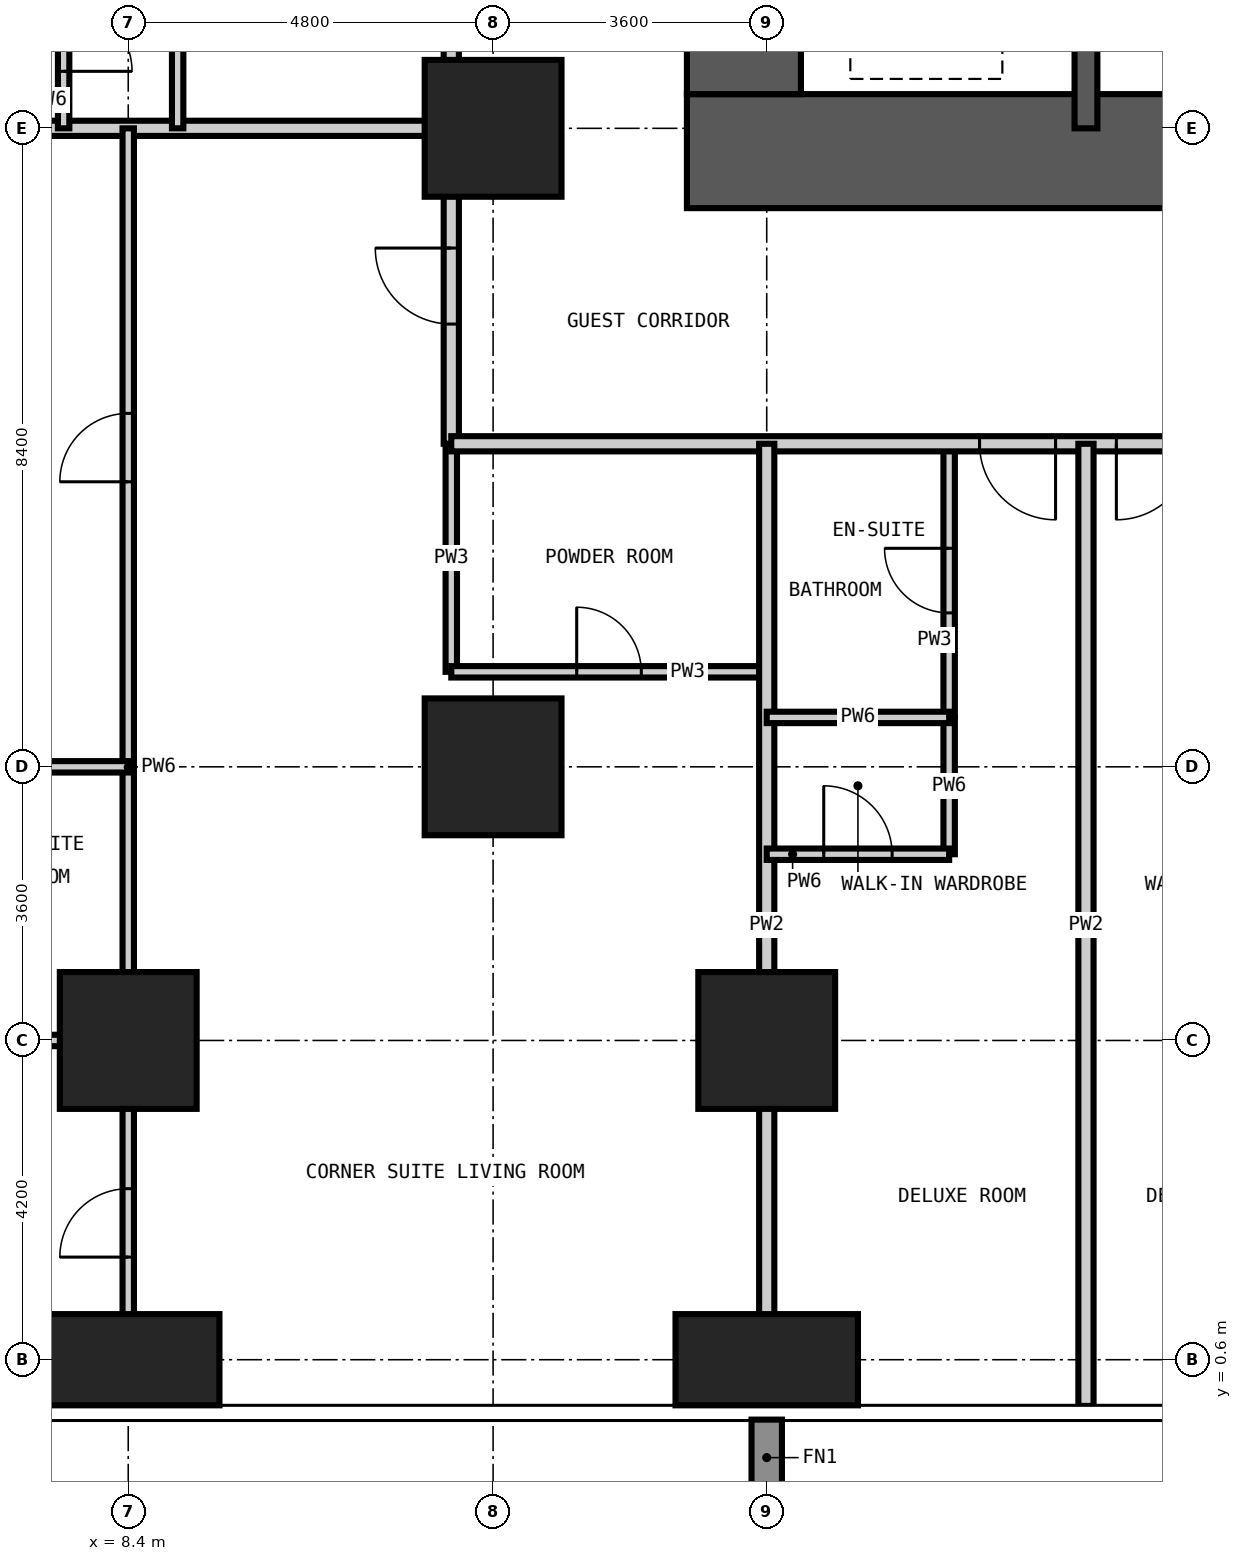
"""IFC4 building model, lengths in metres.
Left out: names, types, materials, properties, quantities, classifications, styles, units other than length and angle.
Written with IfcOpenShell. Run it as: python <this file> out.ifc"""

import sys

from ifc_helpers import new_model, si_unit, direction, frame, frame_2d, origin, origin_2d, place, context, subcontext, project, spatial, rectangle, extrude, element, fill, save


model = new_model("IFC4")
c1 = context("Model", 3, precision=1e-05, world=origin(), true_north=direction((0.0, 1.0)))
c2 = subcontext(c1, "Body", "Model", "MODEL_VIEW")
j1 = project(units=[si_unit("LENGTHUNIT", "METRE"), si_unit("PLANEANGLEUNIT", "RADIAN")], contexts=[c1])
p1 = place(None, origin())
s1 = spatial("IfcSite", under=j1, at=p1, CompositionType="ELEMENT")
p2 = place(p1, origin())
s2 = spatial("IfcBuilding", under=s1, at=p2, CompositionType="ELEMENT")
p3 = place(p2, frame((0.0, 0.0, 70.2)))
s3 = spatial("IfcBuildingStorey", under=s2, at=p3, CompositionType="ELEMENT", Elevation=70.2)
p4 = place(p3, frame((8.4, 0.6, -0.35), z_axis=(0.0, 0.0, 1.0), x_axis=(1.0, 0.0, 0.0)))
e1 = element("IfcColumn", 1, at=p4, inside=s3, PredefinedType="COLUMN", context=c2, shape_type="SweptSolid", body=[
    extrude(rectangle(XDim=2.4, YDim=1.2, at=origin_2d()), origin(), (0.0, 0.0, 1.0), 3.6),
])
for number, where, z_axis, x_axis in (
    (2, (8.4, 4.8, -0.35), (0.0, 0.0, 1.0), (1.0, 0.0, 0.0)),
    (3, (13.2, 8.4, -0.35), (0.0, 0.0, 1.0), (1.0, 0.0, 0.0)),
    (4, (13.2, 16.8, -0.35), (0.0, 0.0, 1.0), (1.0, 0.0, 0.0)),
):
    element("IfcColumn", number, at=place(p3, frame(where, z_axis=z_axis, x_axis=x_axis)), inside=s3, PredefinedType="COLUMN", context=c2, shape_type="SweptSolid", body=[
        extrude(rectangle(XDim=1.8, YDim=1.8, at=origin_2d()), origin(), (0.0, 0.0, 1.0), 3.6),
    ])
p5 = place(p3, frame((16.8, 0.6, -0.35), z_axis=(0.0, 0.0, 1.0), x_axis=(1.0, 0.0, 0.0)))
e5 = element("IfcColumn", 5, at=p5, inside=s3, PredefinedType="COLUMN", context=c2, shape_type="SweptSolid", body=[
    extrude(rectangle(XDim=2.4, YDim=1.2, at=origin_2d()), origin(), (0.0, 0.0, 1.0), 3.6),
])
p6 = place(p3, frame((16.8, 4.8, -0.35), z_axis=(0.0, 0.0, 1.0), x_axis=(1.0, 0.0, 0.0)))
e6 = element("IfcColumn", 6, at=p6, inside=s3, PredefinedType="COLUMN", context=c2, shape_type="SweptSolid", body=[
    extrude(rectangle(XDim=1.8, YDim=1.8, at=origin_2d()), origin(), (0.0, 0.0, 1.0), 3.6),
])
p7 = place(p3, frame((15.75, 16.5, -0.35), z_axis=(0.0, 0.0, 1.0), x_axis=(1.0, 0.0, 0.0)))
e7 = element("IfcWall", 7, at=p7, inside=s3, PredefinedType="SHEAR", context=c2, shape_type="SweptSolid", body=[
    extrude(rectangle(XDim=27.3, YDim=1.5, at=frame_2d((13.65, 0.0))), origin(), (0.0, 0.0, 1.0), 3.6),
])
p8 = place(p7, frame((13.15, 0.0, 0.35)))
e8 = element("IfcOpeningElement", 8, at=p8, cuts=e7, PredefinedType="OPENING", context=c2, shape_type="SweptSolid", body=[
    extrude(rectangle(XDim=1.0, YDim=2.1, at=frame_2d((0.5, 1.05))), frame((0.0, 0.76, 0.0), z_axis=(0.0, -1.0, 0.0), x_axis=(1.0, 0.0, 0.0)), (0.0, 0.0, 1.0), 1.52),
])
p9 = place(p7, frame((19.45, 0.0, 0.35)))
e9 = element("IfcOpeningElement", 9, at=p9, cuts=e7, PredefinedType="OPENING", context=c2, shape_type="SweptSolid", body=[
    extrude(rectangle(XDim=1.0, YDim=2.1, at=frame_2d((0.5, 1.05))), frame((0.0, 0.76, 0.0), z_axis=(0.0, -1.0, 0.0), x_axis=(1.0, 0.0, 0.0)), (0.0, 0.0, 1.0), 1.52),
])
p10 = place(p3, frame((16.5, 41.55, -0.35), z_axis=(0.0, 0.0, 1.0), x_axis=(0.0, -1.0, 0.0)))
e10 = element("IfcWall", 10, at=p10, inside=s3, PredefinedType="SHEAR", context=c2, shape_type="SweptSolid", body=[
    extrude(rectangle(XDim=24.3, YDim=1.5, at=frame_2d((12.15, 0.0))), origin(), (0.0, 0.0, 1.0), 3.6),
])
p11 = place(p10, frame((11.25, 0.0, 0.35)))
e11 = element("IfcOpeningElement", 11, at=p11, cuts=e10, PredefinedType="OPENING", context=c2, shape_type="SweptSolid", body=[
    extrude(rectangle(XDim=1.8, YDim=2.2, at=frame_2d((0.9, 1.1))), frame((0.0, 0.76, 0.0), z_axis=(0.0, -1.0, 0.0), x_axis=(1.0, 0.0, 0.0)), (0.0, 0.0, 1.0), 1.52),
])
p12 = place(p10, frame((20.05, 0.0, 0.35)))
e12 = element("IfcOpeningElement", 12, at=p12, cuts=e10, PredefinedType="OPENING", context=c2, shape_type="SweptSolid", body=[
    extrude(rectangle(XDim=1.0, YDim=2.1, at=frame_2d((0.5, 1.05))), frame((0.0, 0.76, 0.0), z_axis=(0.0, -1.0, 0.0), x_axis=(1.0, 0.0, 0.0)), (0.0, 0.0, 1.0), 1.52),
])
p13 = place(p10, frame((5.35, 0.0, 0.35)))
e13 = element("IfcOpeningElement", 13, at=p13, cuts=e10, PredefinedType="OPENING", context=c2, shape_type="SweptSolid", body=[
    extrude(rectangle(XDim=1.0, YDim=2.1, at=frame_2d((0.5, 1.05))), frame((0.0, 0.76, 0.0), z_axis=(0.0, -1.0, 0.0), x_axis=(1.0, 0.0, 0.0)), (0.0, 0.0, 1.0), 1.52),
])
p14 = place(p3, frame((21.0, 16.8, -0.35), z_axis=(0.0, 0.0, 1.0), x_axis=(0.0, 1.0, 0.0)))
e14 = element("IfcWall", 14, at=p14, inside=s3, PredefinedType="SHEAR", context=c2, shape_type="SweptSolid", body=[
    extrude(rectangle(XDim=2.8, YDim=0.3, at=frame_2d((1.4, 0.0))), origin(), (0.0, 0.0, 1.0), 3.6),
])
p15 = place(p3, frame((12.65, 9.65, 0.0), z_axis=(0.0, 0.0, 1.0), x_axis=(0.0, 1.0, 0.0)))
e15 = element("IfcWall", 15, at=p15, inside=s3, PredefinedType="PARTITIONING", context=c2, shape_type="SweptSolid", body=[
    extrude(rectangle(XDim=3.0, YDim=0.15, at=frame_2d((1.5, 0.0))), origin(), (0.0, 0.0, 1.0), 3.25),
])
p16 = place(p3, frame((19.2, 9.05, 0.0), z_axis=(0.0, 0.0, 1.0), x_axis=(0.0, 1.0, 0.0)))
e16 = element("IfcWall", 16, at=p16, inside=s3, PredefinedType="PARTITIONING", context=c2, shape_type="SweptSolid", body=[
    extrude(rectangle(XDim=3.6, YDim=0.15, at=frame_2d((1.8, 0.0))), origin(), (0.0, 0.0, 1.0), 3.25),
])
p17 = place(p16, frame((1.375, 0.0, 0.0)))
e17 = element("IfcOpeningElement", 17, at=p17, cuts=e16, PredefinedType="OPENING", context=c2, shape_type="SweptSolid", body=[
    extrude(rectangle(XDim=0.85, YDim=2.1, at=frame_2d((0.425, 1.05))), frame((0.0, 0.085, 0.0), z_axis=(0.0, -1.0, 0.0), x_axis=(1.0, 0.0, 0.0)), (0.0, 0.0, 1.0), 0.17),
])
p18 = place(p3, frame((5.4, 4.8, 0.0), z_axis=(0.0, 0.0, 1.0), x_axis=(1.0, 0.0, 0.0)))
e18 = element("IfcWall", 18, at=p18, inside=s3, PredefinedType="PARTITIONING", context=c2, shape_type="SweptSolid", body=[
    extrude(rectangle(XDim=3.0, YDim=0.15, at=frame_2d((1.5, 0.0))), origin(), (0.0, 0.0, 1.0), 3.25),
])
p19 = place(p3, frame((12.65, 9.65, 0.0), z_axis=(0.0, 0.0, 1.0), x_axis=(1.0, 0.0, 0.0)))
e19 = element("IfcWall", 19, at=p19, inside=s3, PredefinedType="PARTITIONING", context=c2, shape_type="SweptSolid", body=[
    extrude(rectangle(XDim=4.15, YDim=0.15, at=frame_2d((2.075, 0.0))), origin(), (0.0, 0.0, 1.0), 3.25),
])
p20 = place(p19, frame((1.65, 0.0, 0.0)))
e20 = element("IfcOpeningElement", 20, at=p20, cuts=e19, PredefinedType="OPENING", context=c2, shape_type="SweptSolid", body=[
    extrude(rectangle(XDim=0.85, YDim=2.1, at=frame_2d((0.425, 1.05))), frame((0.0, 0.085, 0.0), z_axis=(0.0, -1.0, 0.0), x_axis=(1.0, 0.0, 0.0)), (0.0, 0.0, 1.0), 0.17),
])
p21 = place(p3, frame((12.65, 12.65, 0.0), z_axis=(0.0, 0.0, 1.0), x_axis=(0.0, 1.0, 0.0)))
e21 = element("IfcWall", 21, at=p21, inside=s3, PredefinedType="PARTITIONING", context=c2, shape_type="SweptSolid", body=[
    extrude(rectangle(XDim=32.9, YDim=0.2, at=frame_2d((16.45, 0.0))), origin(), (0.0, 0.0, 1.0), 3.25),
])
p22 = place(p21, frame((9.05, 0.0, 0.0)))
e22 = element("IfcOpeningElement", 22, at=p22, cuts=e21, PredefinedType="OPENING", context=c2, shape_type="SweptSolid", body=[
    extrude(rectangle(XDim=1.0, YDim=2.2, at=frame_2d((0.5, 1.1))), frame((0.0, 0.11, 0.0), z_axis=(0.0, -1.0, 0.0), x_axis=(1.0, 0.0, 0.0)), (0.0, 0.0, 1.0), 0.22),
])
p23 = place(p21, frame((15.05, 0.0, 0.0)))
e23 = element("IfcOpeningElement", 23, at=p23, cuts=e21, PredefinedType="OPENING", context=c2, shape_type="SweptSolid", body=[
    extrude(rectangle(XDim=1.0, YDim=2.2, at=frame_2d((0.5, 1.1))), frame((0.0, 0.11, 0.0), z_axis=(0.0, -1.0, 0.0), x_axis=(1.0, 0.0, 0.0)), (0.0, 0.0, 1.0), 0.22),
])
p24 = place(p21, frame((25.85, 0.0, 0.0)))
e24 = element("IfcOpeningElement", 24, at=p24, cuts=e21, PredefinedType="OPENING", context=c2, shape_type="SweptSolid", body=[
    extrude(rectangle(XDim=1.0, YDim=2.2, at=frame_2d((0.5, 1.1))), frame((0.0, 0.11, 0.0), z_axis=(0.0, -1.0, 0.0), x_axis=(1.0, 0.0, 0.0)), (0.0, 0.0, 1.0), 0.22),
])
p25 = place(p21, frame((1.575, 0.0, 0.0)))
e25 = element("IfcOpeningElement", 25, at=p25, cuts=e21, PredefinedType="OPENING", context=c2, shape_type="SweptSolid", body=[
    extrude(rectangle(XDim=1.0, YDim=2.2, at=frame_2d((0.5, 1.1))), frame((0.0, 0.11, 0.0), z_axis=(0.0, -1.0, 0.0), x_axis=(1.0, 0.0, 0.0)), (0.0, 0.0, 1.0), 0.22),
])
p26 = place(p21, frame((30.625, 0.0, 0.0)))
e26 = element("IfcOpeningElement", 26, at=p26, cuts=e21, PredefinedType="OPENING", context=c2, shape_type="SweptSolid", body=[
    extrude(rectangle(XDim=1.0, YDim=2.2, at=frame_2d((0.5, 1.1))), frame((0.0, 0.11, 0.0), z_axis=(0.0, -1.0, 0.0), x_axis=(1.0, 0.0, 0.0)), (0.0, 0.0, 1.0), 0.22),
])
p27 = place(p3, frame((44.95, 12.65, 0.0), z_axis=(0.0, 0.0, 1.0), x_axis=(-1.0, 0.0, 0.0)))
e27 = element("IfcWall", 27, at=p27, inside=s3, PredefinedType="PARTITIONING", context=c2, shape_type="SweptSolid", body=[
    extrude(rectangle(XDim=32.3, YDim=0.2, at=frame_2d((16.15, 0.0))), origin(), (0.0, 0.0, 1.0), 3.25),
])
p28 = place(p27, frame((24.35, 0.0, 0.0)))
e28 = element("IfcOpeningElement", 28, at=p28, cuts=e27, PredefinedType="OPENING", context=c2, shape_type="SweptSolid", body=[
    extrude(rectangle(XDim=1.0, YDim=2.2, at=frame_2d((0.5, 1.1))), frame((0.0, 0.11, 0.0), z_axis=(0.0, -1.0, 0.0), x_axis=(1.0, 0.0, 0.0)), (0.0, 0.0, 1.0), 0.22),
])
p29 = place(p27, frame((22.55, 0.0, 0.0)))
e29 = element("IfcOpeningElement", 29, at=p29, cuts=e27, PredefinedType="OPENING", context=c2, shape_type="SweptSolid", body=[
    extrude(rectangle(XDim=1.0, YDim=2.2, at=frame_2d((0.5, 1.1))), frame((0.0, 0.11, 0.0), z_axis=(0.0, -1.0, 0.0), x_axis=(1.0, 0.0, 0.0)), (0.0, 0.0, 1.0), 0.22),
])
p30 = place(p27, frame((15.95, 0.0, 0.0)))
e30 = element("IfcOpeningElement", 30, at=p30, cuts=e27, PredefinedType="OPENING", context=c2, shape_type="SweptSolid", body=[
    extrude(rectangle(XDim=1.0, YDim=2.2, at=frame_2d((0.5, 1.1))), frame((0.0, 0.11, 0.0), z_axis=(0.0, -1.0, 0.0), x_axis=(1.0, 0.0, 0.0)), (0.0, 0.0, 1.0), 0.22),
])
p31 = place(p27, frame((14.15, 0.0, 0.0)))
e31 = element("IfcOpeningElement", 31, at=p31, cuts=e27, PredefinedType="OPENING", context=c2, shape_type="SweptSolid", body=[
    extrude(rectangle(XDim=1.0, YDim=2.2, at=frame_2d((0.5, 1.1))), frame((0.0, 0.11, 0.0), z_axis=(0.0, -1.0, 0.0), x_axis=(1.0, 0.0, 0.0)), (0.0, 0.0, 1.0), 0.22),
])
p32 = place(p27, frame((7.55, 0.0, 0.0)))
e32 = element("IfcOpeningElement", 32, at=p32, cuts=e27, PredefinedType="OPENING", context=c2, shape_type="SweptSolid", body=[
    extrude(rectangle(XDim=1.0, YDim=2.2, at=frame_2d((0.5, 1.1))), frame((0.0, 0.11, 0.0), z_axis=(0.0, -1.0, 0.0), x_axis=(1.0, 0.0, 0.0)), (0.0, 0.0, 1.0), 0.22),
])
p33 = place(p27, frame((5.75, 0.0, 0.0)))
e33 = element("IfcOpeningElement", 33, at=p33, cuts=e27, PredefinedType="OPENING", context=c2, shape_type="SweptSolid", body=[
    extrude(rectangle(XDim=1.0, YDim=2.2, at=frame_2d((0.5, 1.1))), frame((0.0, 0.11, 0.0), z_axis=(0.0, -1.0, 0.0), x_axis=(1.0, 0.0, 0.0)), (0.0, 0.0, 1.0), 0.22),
])
for number, where, z_axis, x_axis in (
    (34, (16.8, -0.008, 0.0), (0.0, 0.0, 1.0), (0.0, 1.0, 0.0)),
    (35, (21.0, -0.008, 0.0), (0.0, 0.0, 1.0), (0.0, 1.0, 0.0)),
    (36, (-0.008, 16.8, 0.0), (0.0, 0.0, 1.0), (1.0, 0.0, 0.0)),
):
    element("IfcWall", number, at=place(p3, frame(where, z_axis=z_axis, x_axis=x_axis)), inside=s3, PredefinedType="PARTITIONING", context=c2, shape_type="SweptSolid", body=[
        extrude(rectangle(XDim=12.658, YDim=0.2, at=frame_2d((6.329, 0.0))), origin(), (0.0, 0.0, 1.0), 3.25),
    ])
p34 = place(p3, frame((7.55, 16.8, 0.0), z_axis=(0.0, 0.0, 1.0), x_axis=(0.0, 1.0, 0.0)))
e37 = element("IfcWall", 37, at=p34, inside=s3, PredefinedType="PARTITIONING", context=c2, shape_type="SweptSolid", body=[
    extrude(rectangle(XDim=2.4, YDim=0.15, at=frame_2d((1.2, 0.0))), origin(), (0.0, 0.0, 1.0), 3.25),
])
p35 = place(p34, frame((0.75, 0.0, 0.0)))
e38 = element("IfcOpeningElement", 38, at=p35, cuts=e37, PredefinedType="OPENING", context=c2, shape_type="SweptSolid", body=[
    extrude(rectangle(XDim=0.9, YDim=2.1, at=frame_2d((0.45, 1.05))), frame((0.0, 0.085, 0.0), z_axis=(0.0, -1.0, 0.0), x_axis=(1.0, 0.0, 0.0)), (0.0, 0.0, 1.0), 0.17),
])
p36 = place(p3, frame((8.4, -0.008, 0.0), z_axis=(0.0, 0.0, 1.0), x_axis=(0.0, 1.0, 0.0)))
e39 = element("IfcWall", 39, at=p36, inside=s3, PredefinedType="PARTITIONING", context=c2, shape_type="SweptSolid", body=[
    extrude(rectangle(XDim=16.808, YDim=0.15, at=frame_2d((8.404, 0.0))), origin(), (0.0, 0.0, 1.0), 3.25),
])
p37 = place(p36, frame((1.958, 0.0, 0.0)))
e40 = element("IfcOpeningElement", 40, at=p37, cuts=e39, PredefinedType="OPENING", context=c2, shape_type="SweptSolid", body=[
    extrude(rectangle(XDim=0.9, YDim=2.1, at=frame_2d((0.45, 1.05))), frame((0.0, 0.085, 0.0), z_axis=(0.0, -1.0, 0.0), x_axis=(1.0, 0.0, 0.0)), (0.0, 0.0, 1.0), 0.17),
])
p38 = place(p36, frame((12.158, 0.0, 0.0)))
e41 = element("IfcOpeningElement", 41, at=p38, cuts=e39, PredefinedType="OPENING", context=c2, shape_type="SweptSolid", body=[
    extrude(rectangle(XDim=0.9, YDim=2.1, at=frame_2d((0.45, 1.05))), frame((0.0, 0.085, 0.0), z_axis=(0.0, -1.0, 0.0), x_axis=(1.0, 0.0, 0.0)), (0.0, 0.0, 1.0), 0.17),
])
p39 = place(p3, frame((9.05, 16.8, 0.0), z_axis=(0.0, 0.0, 1.0), x_axis=(0.0, 1.0, 0.0)))
e42 = element("IfcWall", 42, at=p39, inside=s3, PredefinedType="PARTITIONING", context=c2, shape_type="SweptSolid", body=[
    extrude(rectangle(XDim=2.4, YDim=0.15, at=frame_2d((1.2, 0.0))), origin(), (0.0, 0.0, 1.0), 3.25),
])
p40 = place(p3, frame((19.2, 7.25, 0.0), z_axis=(0.0, 0.0, 1.0), x_axis=(0.0, 1.0, 0.0)))
e43 = element("IfcWall", 43, at=p40, inside=s3, PredefinedType="PARTITIONING", context=c2, shape_type="SweptSolid", body=[
    extrude(rectangle(XDim=1.8, YDim=0.15, at=frame_2d((0.9, 0.0))), origin(), (0.0, 0.0, 1.0), 3.25),
])
p41 = place(p3, frame((16.8, 7.25, 0.0), z_axis=(0.0, 0.0, 1.0), x_axis=(1.0, 0.0, 0.0)))
e44 = element("IfcWall", 44, at=p41, inside=s3, PredefinedType="PARTITIONING", context=c2, shape_type="SweptSolid", body=[
    extrude(rectangle(XDim=2.4, YDim=0.15, at=frame_2d((1.2, 0.0))), origin(), (0.0, 0.0, 1.0), 3.25),
])
p42 = place(p41, frame((0.75, 0.0, 0.0)))
e45 = element("IfcOpeningElement", 45, at=p42, cuts=e44, PredefinedType="OPENING", context=c2, shape_type="SweptSolid", body=[
    extrude(rectangle(XDim=0.9, YDim=2.1, at=frame_2d((0.45, 1.05))), frame((0.0, 0.085, 0.0), z_axis=(0.0, -1.0, 0.0), x_axis=(1.0, 0.0, 0.0)), (0.0, 0.0, 1.0), 0.17),
])
p43 = place(p3, frame((-0.008, 8.4, 0.0), z_axis=(0.0, 0.0, 1.0), x_axis=(1.0, 0.0, 0.0)))
e46 = element("IfcWall", 46, at=p43, inside=s3, PredefinedType="PARTITIONING", context=c2, shape_type="SweptSolid", body=[
    extrude(rectangle(XDim=8.408, YDim=0.15, at=frame_2d((4.204, 0.0))), origin(), (0.0, 0.0, 1.0), 3.25),
])
p44 = place(p43, frame((2.958, 0.0, 0.0)))
e47 = element("IfcOpeningElement", 47, at=p44, cuts=e46, PredefinedType="OPENING", context=c2, shape_type="SweptSolid", body=[
    extrude(rectangle(XDim=0.9, YDim=2.1, at=frame_2d((0.45, 1.05))), frame((0.0, 0.085, 0.0), z_axis=(0.0, -1.0, 0.0), x_axis=(1.0, 0.0, 0.0)), (0.0, 0.0, 1.0), 0.17),
])
p45 = place(p3, frame((16.8, 9.05, 0.0), z_axis=(0.0, 0.0, 1.0), x_axis=(1.0, 0.0, 0.0)))
e48 = element("IfcWall", 48, at=p45, inside=s3, PredefinedType="PARTITIONING", context=c2, shape_type="SweptSolid", body=[
    extrude(rectangle(XDim=2.4, YDim=0.15, at=frame_2d((1.2, 0.0))), origin(), (0.0, 0.0, 1.0), 3.25),
])
p46 = place(p28, origin())
e49 = element("IfcDoor", 49, at=p46, inside=s3, OperationType="SINGLE_SWING_LEFT", PredefinedType="DOOR", context=c2, shape_type="SweptSolid", body=[
    extrude(rectangle(XDim=1.0, YDim=2.2, at=frame_2d((0.5, 1.1))), frame((0.0, 0.025, 0.0), z_axis=(0.0, -1.0, 0.0), x_axis=(1.0, 0.0, 0.0)), (0.0, 0.0, 1.0), 0.05),
])
fill(e28, e49)
p47 = place(p17, origin())
e50 = element("IfcDoor", 50, at=p47, inside=s3, OperationType="SINGLE_SWING_RIGHT", PredefinedType="DOOR", context=c2, shape_type="SweptSolid", body=[
    extrude(rectangle(XDim=0.85, YDim=2.1, at=frame_2d((0.425, 1.05))), frame((0.0, 0.025, 0.0), z_axis=(0.0, -1.0, 0.0), x_axis=(1.0, 0.0, 0.0)), (0.0, 0.0, 1.0), 0.05),
])
fill(e17, e50)
p48 = place(p42, origin())
e51 = element("IfcDoor", 51, at=p48, inside=s3, OperationType="SINGLE_SWING_LEFT", PredefinedType="DOOR", context=c2, shape_type="SweptSolid", body=[
    extrude(rectangle(XDim=0.9, YDim=2.1, at=frame_2d((0.45, 1.05))), frame((0.0, 0.025, 0.0), z_axis=(0.0, -1.0, 0.0), x_axis=(1.0, 0.0, 0.0)), (0.0, 0.0, 1.0), 0.05),
])
fill(e45, e51)
p49 = place(p29, origin())
e52 = element("IfcDoor", 52, at=p49, inside=s3, OperationType="SINGLE_SWING_RIGHT", PredefinedType="DOOR", context=c2, shape_type="SweptSolid", body=[
    extrude(rectangle(XDim=1.0, YDim=2.2, at=frame_2d((0.5, 1.1))), frame((0.0, 0.025, 0.0), z_axis=(0.0, -1.0, 0.0), x_axis=(1.0, 0.0, 0.0)), (0.0, 0.0, 1.0), 0.05),
])
fill(e29, e52)
p50 = place(p35, frame((0.9, 0.0, 0.0), z_axis=(0.0, 0.0, 1.0), x_axis=(-1.0, 0.0, 0.0)))
e53 = element("IfcDoor", 53, at=p50, inside=s3, OperationType="SINGLE_SWING_RIGHT", PredefinedType="DOOR", context=c2, shape_type="SweptSolid", body=[
    extrude(rectangle(XDim=0.9, YDim=2.1, at=frame_2d((0.45, 1.05))), frame((0.0, 0.025, 0.0), z_axis=(0.0, -1.0, 0.0), x_axis=(1.0, 0.0, 0.0)), (0.0, 0.0, 1.0), 0.05),
])
fill(e38, e53)
p51 = place(p25, origin())
e54 = element("IfcDoor", 54, at=p51, inside=s3, OperationType="SINGLE_SWING_RIGHT", PredefinedType="DOOR", context=c2, shape_type="SweptSolid", body=[
    extrude(rectangle(XDim=1.0, YDim=2.2, at=frame_2d((0.5, 1.1))), frame((0.0, 0.025, 0.0), z_axis=(0.0, -1.0, 0.0), x_axis=(1.0, 0.0, 0.0)), (0.0, 0.0, 1.0), 0.05),
])
fill(e25, e54)
p52 = place(p20, origin())
e55 = element("IfcDoor", 55, at=p52, inside=s3, OperationType="SINGLE_SWING_LEFT", PredefinedType="DOOR", context=c2, shape_type="SweptSolid", body=[
    extrude(rectangle(XDim=0.85, YDim=2.1, at=frame_2d((0.425, 1.05))), frame((0.0, 0.025, 0.0), z_axis=(0.0, -1.0, 0.0), x_axis=(1.0, 0.0, 0.0)), (0.0, 0.0, 1.0), 0.05),
])
fill(e20, e55)
p53 = place(p37, origin())
e56 = element("IfcDoor", 56, at=p53, inside=s3, OperationType="SINGLE_SWING_LEFT", PredefinedType="DOOR", context=c2, shape_type="SweptSolid", body=[
    extrude(rectangle(XDim=0.9, YDim=2.1, at=frame_2d((0.45, 1.05))), frame((0.0, 0.025, 0.0), z_axis=(0.0, -1.0, 0.0), x_axis=(1.0, 0.0, 0.0)), (0.0, 0.0, 1.0), 0.05),
])
fill(e40, e56)
p54 = place(p38, origin())
e57 = element("IfcDoor", 57, at=p54, inside=s3, OperationType="SINGLE_SWING_LEFT", PredefinedType="DOOR", context=c2, shape_type="SweptSolid", body=[
    extrude(rectangle(XDim=0.9, YDim=2.1, at=frame_2d((0.45, 1.05))), frame((0.0, 0.025, 0.0), z_axis=(0.0, -1.0, 0.0), x_axis=(1.0, 0.0, 0.0)), (0.0, 0.0, 1.0), 0.05),
])
fill(e41, e57)
save(model, sys.argv[1])
